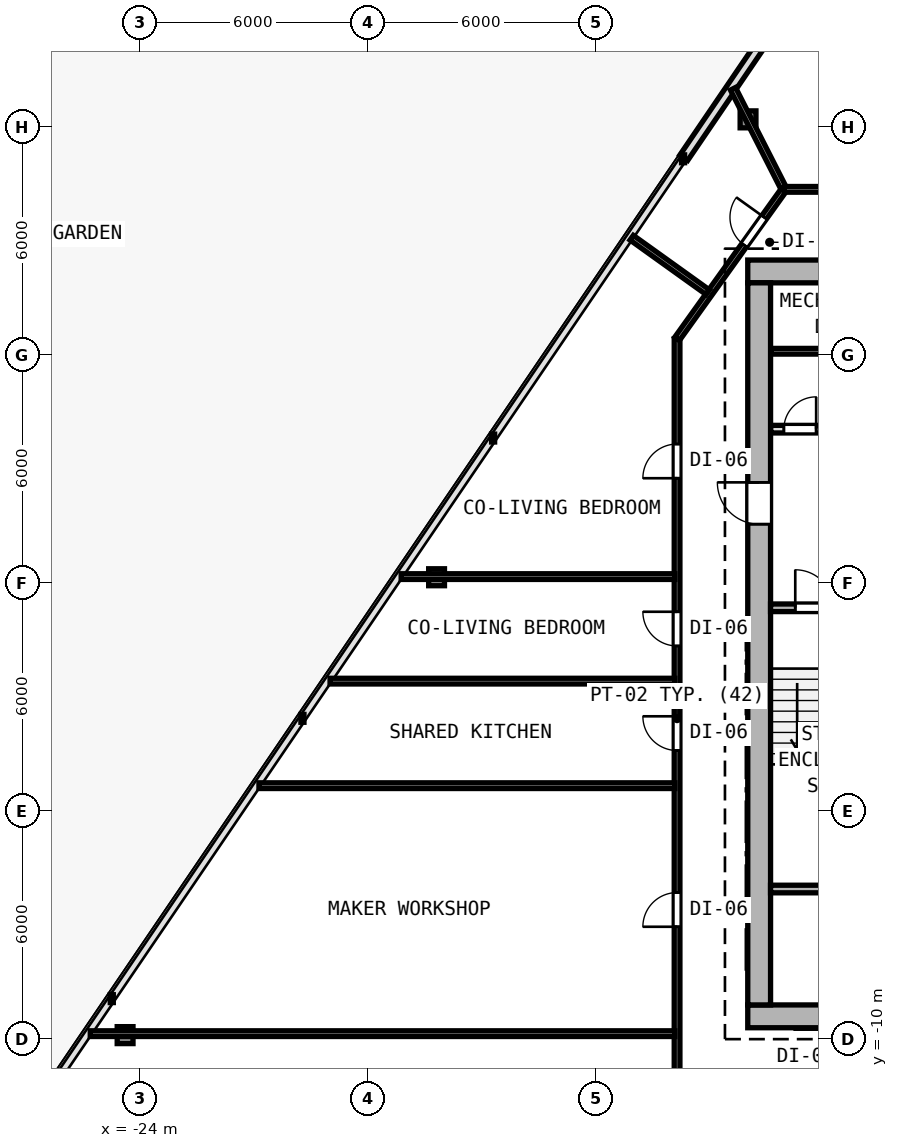
"""IFC4 building model, lengths in metres.
Left out: names, types, materials, properties, quantities, classifications, styles, units other than length and angle.
Written with IfcOpenShell. Run it as: python <this file> out.ifc"""

import sys

from ifc_helpers import new_model, si_unit, direction, frame, frame_2d, origin, origin_2d, place, context, subcontext, project, spatial, rectangle, i_section, extrude, element, fill, save


model = new_model("IFC4")
c1 = context("Model", 3, precision=1e-05, world=origin(), true_north=direction((0.0, 1.0)))
c2 = subcontext(c1, "Body", "Model", "MODEL_VIEW")
j1 = project(units=[si_unit("LENGTHUNIT", "METRE"), si_unit("PLANEANGLEUNIT", "RADIAN")], contexts=[c1])
p1 = place(None, origin())
s1 = spatial("IfcSite", under=j1, at=p1, CompositionType="ELEMENT")
p2 = place(p1, origin())
s2 = spatial("IfcBuilding", under=s1, at=p2, CompositionType="ELEMENT")
p3 = place(p2, frame((0.0, 0.0, 26.4)))
s3 = spatial("IfcBuildingStorey", under=s2, at=p3, CompositionType="ELEMENT", Elevation=26.4)
for number, where, z_axis, x_axis in (
    (1, (-7.7, -9.4, 0.0), (0.0, 0.0, 1.0), (1.0, 0.0, 0.0)),
    (2, (-7.7, 10.2, 0.0), (0.0, 0.0, 1.0), (1.0, 0.0, 0.0)),
    (3, (-7.7, 2.0, 0.0), (0.0, 0.0, 1.0), (1.0, 0.0, 0.0)),
):
    element("IfcColumn", number, at=place(p3, frame(where, z_axis=z_axis, x_axis=x_axis)), inside=s3, PredefinedType="COLUMN", context=c2, shape_type="SweptSolid", body=[
        extrude(i_section(OverallWidth=0.416, OverallDepth=0.446, WebThickness=0.025, FlangeThickness=0.04, FilletRadius=0.015, at=origin_2d()), origin(), (0.0, 0.0, 1.0), 3.6),
    ])
p4 = place(p3, frame((-7.992, 14.202, 0.015), z_axis=(0.008798483968, -0.002591801479, 0.999957933738), x_axis=(0.282568886397, 0.959247009086, 0.0)))
e4 = element("IfcColumn", 4, at=p4, inside=s3, PredefinedType="COLUMN", context=c2, shape_type="SweptSolid", body=[
    extrude(i_section(OverallWidth=0.416, OverallDepth=0.446, WebThickness=0.025, FlangeThickness=0.04, FilletRadius=0.015, at=origin_2d()), origin(), (0.0, 0.0, 1.0), 3.58),
])
p5 = place(p3, frame((-16.188, 2.154, 0.015), z_axis=(0.017048787183, 0.009547320822, 0.999809075534), x_axis=(-0.488603368932, 0.87250601595, 0.0)))
e5 = element("IfcColumn", 5, at=p5, inside=s3, PredefinedType="COLUMN", context=c2, shape_type="SweptSolid", body=[
    extrude(i_section(OverallWidth=0.416, OverallDepth=0.446, WebThickness=0.025, FlangeThickness=0.04, FilletRadius=0.015, at=origin_2d()), origin(), (0.0, 0.0, 1.0), 3.58),
])
p6 = place(p3, frame((-24.385, -9.894, 0.015), z_axis=(0.025291188493, 0.021678161566, 0.999445052565), x_axis=(-0.650791373456, 0.759256602365, 0.0)))
e6 = element("IfcColumn", 6, at=p6, inside=s3, PredefinedType="COLUMN", context=c2, shape_type="SweptSolid", body=[
    extrude(i_section(OverallWidth=0.416, OverallDepth=0.446, WebThickness=0.025, FlangeThickness=0.04, FilletRadius=0.015, at=origin_2d()), origin(), (0.0, 0.0, 1.0), 3.581),
])
p7 = place(p3, frame((-9.684, 13.191, 0.0), z_axis=(0.0, 0.0, 1.0), x_axis=(0.562473549685, 0.826815279192, 0.0)))
e7 = element("IfcWall", 7, at=p7, inside=s3, PredefinedType="SOLIDWALL", context=c2, shape_type="SweptSolid", body=[
    extrude(rectangle(XDim=12.536, YDim=0.25, at=frame_2d((6.268, 0.0))), origin(), (0.0, 0.0, 1.0), 3.35),
])
p8 = place(p7, frame((5.468, 0.0, 0.62)))
e8 = element("IfcOpeningElement", 8, at=p8, cuts=e7, PredefinedType="OPENING", context=c2, shape_type="SweptSolid", body=[
    extrude(rectangle(XDim=1.6, YDim=2.1, at=frame_2d((0.8, 1.05))), frame((0.0, 0.135, 0.0), z_axis=(0.0, -1.0, 0.0), x_axis=(1.0, 0.0, 0.0)), (0.0, 0.0, 1.0), 0.27),
])
p9 = place(p3, frame((-8.0, -9.4, 0.0), z_axis=(0.0, 0.0, 1.0), x_axis=(1.0, 0.0, 0.0)))
e9 = element("IfcWall", 9, at=p9, inside=s3, PredefinedType="SHEAR", context=c2, shape_type="SweptSolid", body=[
    extrude(rectangle(XDim=16.0, YDim=0.6, at=frame_2d((8.0, 0.0))), origin(), (0.0, 0.0, 1.0), 3.35),
])
p10 = place(p9, frame((9.65, 0.0, 0.0)))
e10 = element("IfcOpeningElement", 10, at=p10, cuts=e9, PredefinedType="OPENING", context=c2, shape_type="SweptSolid", body=[
    extrude(rectangle(XDim=1.5, YDim=2.2, at=frame_2d((0.75, 1.1))), frame((0.0, 0.31, 0.0), z_axis=(0.0, -1.0, 0.0), x_axis=(1.0, 0.0, 0.0)), (0.0, 0.0, 1.0), 0.62),
])
p11 = place(p3, frame((8.0, 10.2, 0.0), z_axis=(0.0, 0.0, 1.0), x_axis=(-1.0, 0.0, 0.0)))
e11 = element("IfcWall", 11, at=p11, inside=s3, PredefinedType="SHEAR", context=c2, shape_type="SweptSolid", body=[
    extrude(rectangle(XDim=16.0, YDim=0.6, at=frame_2d((8.0, 0.0))), origin(), (0.0, 0.0, 1.0), 3.35),
])
p12 = place(p11, frame((4.45, 0.0, 0.0)))
e12 = element("IfcOpeningElement", 12, at=p12, cuts=e11, PredefinedType="OPENING", context=c2, shape_type="SweptSolid", body=[
    extrude(rectangle(XDim=1.1, YDim=2.15, at=frame_2d((0.55, 1.075))), frame((0.0, 0.31, 0.0), z_axis=(0.0, -1.0, 0.0), x_axis=(1.0, 0.0, 0.0)), (0.0, 0.0, 1.0), 0.62),
])
p13 = place(p3, frame((-7.7, -9.1, 0.0), z_axis=(0.0, 0.0, 1.0), x_axis=(0.0, 1.0, 0.0)))
e13 = element("IfcWall", 13, at=p13, inside=s3, PredefinedType="SHEAR", context=c2, shape_type="SweptSolid", body=[
    extrude(rectangle(XDim=19.0, YDim=0.6, at=frame_2d((9.5, 0.0))), origin(), (0.0, 0.0, 1.0), 3.35),
])
p14 = place(p13, frame((12.65, 0.0, 0.0)))
e14 = element("IfcOpeningElement", 14, at=p14, cuts=e13, PredefinedType="OPENING", context=c2, shape_type="SweptSolid", body=[
    extrude(rectangle(XDim=1.1, YDim=2.15, at=frame_2d((0.55, 1.075))), frame((0.0, 0.31, 0.0), z_axis=(0.0, -1.0, 0.0), x_axis=(1.0, 0.0, 0.0)), (0.0, 0.0, 1.0), 0.62),
])
p15 = place(p3, frame((-7.4, 1.35, 0.0), z_axis=(0.0, 0.0, 1.0), x_axis=(1.0, 0.0, 0.0)))
e15 = element("IfcWall", 15, at=p15, inside=s3, PredefinedType="SOLIDWALL", context=c2, shape_type="SweptSolid", body=[
    extrude(rectangle(XDim=3.35, YDim=0.2, at=frame_2d((1.675, 0.0))), origin(), (0.0, 0.0, 1.0), 3.35),
])
p16 = place(p15, frame((0.65, 0.0, 0.0)))
e16 = element("IfcOpeningElement", 16, at=p16, cuts=e15, PredefinedType="OPENING", context=c2, shape_type="SweptSolid", body=[
    extrude(rectangle(XDim=1.0, YDim=2.15, at=frame_2d((0.5, 1.075))), frame((0.0, 0.11, 0.0), z_axis=(0.0, -1.0, 0.0), x_axis=(1.0, 0.0, 0.0)), (0.0, 0.0, 1.0), 0.22),
])
p17 = place(p3, frame((-7.395, 6.05, 0.0), z_axis=(0.0, 0.0, 1.0), x_axis=(1.0, 0.0, 0.0)))
e17 = element("IfcWall", 17, at=p17, inside=s3, PredefinedType="SOLIDWALL", context=c2, shape_type="SweptSolid", body=[
    extrude(rectangle(XDim=3.545, YDim=0.2, at=frame_2d((1.772, 0.0))), origin(), (0.0, 0.0, 1.0), 3.35),
])
p18 = place(p17, frame((0.345, 0.0, 0.0)))
e18 = element("IfcOpeningElement", 18, at=p18, cuts=e17, PredefinedType="OPENING", context=c2, shape_type="SweptSolid", body=[
    extrude(rectangle(XDim=0.85, YDim=2.1, at=frame_2d((0.425, 1.05))), frame((0.0, 0.11, 0.0), z_axis=(0.0, -1.0, 0.0), x_axis=(1.0, 0.0, 0.0)), (0.0, 0.0, 1.0), 0.22),
])
p19 = place(p17, frame((2.145, 0.0, 0.0)))
e19 = element("IfcOpeningElement", 19, at=p19, cuts=e17, PredefinedType="OPENING", context=c2, shape_type="SweptSolid", body=[
    extrude(rectangle(XDim=0.85, YDim=2.1, at=frame_2d((0.425, 1.05))), frame((0.0, 0.11, 0.0), z_axis=(0.0, -1.0, 0.0), x_axis=(1.0, 0.0, 0.0)), (0.0, 0.0, 1.0), 0.22),
])
p20 = place(p3, frame((-7.395, 8.1, 0.0), z_axis=(0.0, 0.0, 1.0), x_axis=(1.0, 0.0, 0.0)))
e20 = element("IfcWall", 20, at=p20, inside=s3, PredefinedType="PARTITIONING", context=c2, shape_type="SweptSolid", body=[
    extrude(rectangle(XDim=3.545, YDim=0.15, at=frame_2d((1.772, 0.0))), origin(), (0.0, 0.0, 1.0), 3.35),
])
p21 = place(p3, frame((-7.4, -6.05, 0.0), z_axis=(0.0, 0.0, 1.0), x_axis=(1.0, 0.0, 0.0)))
e21 = element("IfcWall", 21, at=p21, inside=s3, PredefinedType="SOLIDWALL", context=c2, shape_type="SweptSolid", body=[
    extrude(rectangle(XDim=3.35, YDim=0.2, at=frame_2d((1.675, 0.0))), origin(), (0.0, 0.0, 1.0), 3.35),
])
p22 = place(p3, frame((-9.86, -11.56, 0.0), z_axis=(0.0, 0.0, 1.0), x_axis=(0.0, 1.0, 0.0)))
e22 = element("IfcWall", 22, at=p22, inside=s3, PredefinedType="PARTITIONING", context=c2, shape_type="SweptSolid", body=[
    extrude(rectangle(XDim=19.986, YDim=0.15, at=frame_2d((9.993, 0.0))), origin(), (0.0, 0.0, 1.0), 2.609),
])
p23 = place(p22, frame((9.155, 0.0, 0.0)))
e23 = element("IfcOpeningElement", 23, at=p23, cuts=e22, PredefinedType="OPENING", context=c2, shape_type="SweptSolid", body=[
    extrude(rectangle(XDim=0.9, YDim=2.1, at=frame_2d((0.45, 1.05))), frame((0.0, 0.085, 0.0), z_axis=(0.0, -1.0, 0.0), x_axis=(1.0, 0.0, 0.0)), (0.0, 0.0, 1.0), 0.17),
])
p24 = place(p22, frame((4.517, 0.0, 0.0)))
e24 = element("IfcOpeningElement", 24, at=p24, cuts=e22, PredefinedType="OPENING", context=c2, shape_type="SweptSolid", body=[
    extrude(rectangle(XDim=0.9, YDim=2.1, at=frame_2d((0.45, 1.05))), frame((0.0, 0.085, 0.0), z_axis=(0.0, -1.0, 0.0), x_axis=(1.0, 0.0, 0.0)), (0.0, 0.0, 1.0), 0.17),
])
p25 = place(p22, frame((16.319, 0.0, 0.0)))
e25 = element("IfcOpeningElement", 25, at=p25, cuts=e22, PredefinedType="OPENING", context=c2, shape_type="SweptSolid", body=[
    extrude(rectangle(XDim=0.9, YDim=2.1, at=frame_2d((0.45, 1.05))), frame((0.0, 0.085, 0.0), z_axis=(0.0, -1.0, 0.0), x_axis=(1.0, 0.0, 0.0)), (0.0, 0.0, 1.0), 0.17),
])
p26 = place(p22, frame((11.906, 0.0, 0.0)))
e26 = element("IfcOpeningElement", 26, at=p26, cuts=e22, PredefinedType="OPENING", context=c2, shape_type="SweptSolid", body=[
    extrude(rectangle(XDim=0.9, YDim=2.1, at=frame_2d((0.45, 1.05))), frame((0.0, 0.085, 0.0), z_axis=(0.0, -1.0, 0.0), x_axis=(1.0, 0.0, 0.0)), (0.0, 0.0, 1.0), 0.17),
])
p27 = place(p3, frame((-9.86, 8.426, 0.0), z_axis=(0.0, 0.0, 1.0), x_axis=(0.582449511476, 0.812866881218, 0.0)))
e27 = element("IfcWall", 27, at=p27, inside=s3, PredefinedType="PARTITIONING", context=c2, shape_type="SweptSolid", body=[
    extrude(rectangle(XDim=4.84, YDim=0.15, at=frame_2d((2.42, 0.0))), origin(), (0.0, 0.0, 1.0), 2.725),
])
p28 = place(p27, frame((3.035, 0.0, 0.0)))
e28 = element("IfcOpeningElement", 28, at=p28, cuts=e27, PredefinedType="OPENING", context=c2, shape_type="SweptSolid", body=[
    extrude(rectangle(XDim=0.9, YDim=2.1, at=frame_2d((0.45, 1.05))), frame((0.0, 0.085, 0.0), z_axis=(0.0, -1.0, 0.0), x_axis=(1.0, 0.0, 0.0)), (0.0, 0.0, 1.0), 0.17),
])
p29 = place(p3, frame((-7.041, 12.36, 0.0), z_axis=(0.0, 0.0, 1.0), x_axis=(1.0, 0.0, 0.0)))
e29 = element("IfcWall", 29, at=p29, inside=s3, PredefinedType="PARTITIONING", context=c2, shape_type="SweptSolid", body=[
    extrude(rectangle(XDim=14.082, YDim=0.15, at=frame_2d((7.041, 0.0))), origin(), (0.0, 0.0, 1.0), 3.35),
])
p30 = place(p29, frame((10.256, 0.0, 0.0)))
e30 = element("IfcOpeningElement", 30, at=p30, cuts=e29, PredefinedType="OPENING", context=c2, shape_type="SweptSolid", body=[
    extrude(rectangle(XDim=0.9, YDim=2.1, at=frame_2d((0.45, 1.05))), frame((0.0, 0.085, 0.0), z_axis=(0.0, -1.0, 0.0), x_axis=(1.0, 0.0, 0.0)), (0.0, 0.0, 1.0), 0.17),
])
p31 = place(p29, frame((3.393, 0.0, 0.0)))
e31 = element("IfcOpeningElement", 31, at=p31, cuts=e29, PredefinedType="OPENING", context=c2, shape_type="SweptSolid", body=[
    extrude(rectangle(XDim=0.9, YDim=2.1, at=frame_2d((0.45, 1.05))), frame((0.0, 0.085, 0.0), z_axis=(0.0, -1.0, 0.0), x_axis=(1.0, 0.0, 0.0)), (0.0, 0.0, 1.0), 0.17),
])
p32 = place(p3, frame((-7.064, 12.404, 0.0), z_axis=(0.0, 0.0, 1.0), x_axis=(-0.453724092979, 0.891142215053, 0.0)))
e32 = element("IfcWall", 32, at=p32, inside=s3, PredefinedType="PARTITIONING", context=c2, shape_type="SweptSolid", body=[
    extrude(rectangle(XDim=2.92, YDim=0.15, at=frame_2d((1.46, 0.0))), origin(), (0.0, 0.0, 1.0), 2.725),
])
p33 = place(p3, frame((-9.92, 2.171, 0.0), z_axis=(0.0, 0.0, 1.0), x_axis=(-1.0, 0.0, 0.0)))
e33 = element("IfcWall", 33, at=p33, inside=s3, PredefinedType="PARTITIONING", context=c2, shape_type="SweptSolid", body=[
    extrude(rectangle(XDim=7.2, YDim=0.15, at=frame_2d((3.6, 0.0))), origin(), (0.0, 0.0, 1.0), 2.725),
])
p34 = place(p3, frame((-9.92, -9.855, 0.0), z_axis=(0.0, 0.0, 1.0), x_axis=(-1.0, 0.0, 0.0)))
e34 = element("IfcWall", 34, at=p34, inside=s3, PredefinedType="PARTITIONING", context=c2, shape_type="SweptSolid", body=[
    extrude(rectangle(XDim=15.382, YDim=0.15, at=frame_2d((7.691, 0.0))), origin(), (0.0, 0.0, 1.0), 2.609),
])
p35 = place(p3, frame((-9.92, -3.331, 0.0), z_axis=(0.0, 0.0, 1.0), x_axis=(-1.0, 0.0, 0.0)))
e35 = element("IfcWall", 35, at=p35, inside=s3, PredefinedType="PARTITIONING", context=c2, shape_type="SweptSolid", body=[
    extrude(rectangle(XDim=10.943, YDim=0.15, at=frame_2d((5.471, 0.0))), origin(), (0.0, 0.0, 1.0), 2.735),
])
p36 = place(p3, frame((-9.053, 9.654, 0.0), z_axis=(0.0, 0.0, 1.0), x_axis=(-0.812868003182, 0.58244794566, 0.0)))
e36 = element("IfcWall", 36, at=p36, inside=s3, PredefinedType="PARTITIONING", context=c2, shape_type="SweptSolid", body=[
    extrude(rectangle(XDim=2.461, YDim=0.15, at=frame_2d((1.231, 0.0))), origin(), (0.0, 0.0, 1.0), 2.735),
])
p37 = place(p3, frame((-9.92, -0.58, 0.0), z_axis=(0.0, 0.0, 1.0), x_axis=(-1.0, 0.0, 0.0)))
e37 = element("IfcWall", 37, at=p37, inside=s3, PredefinedType="PARTITIONING", context=c2, shape_type="SweptSolid", body=[
    extrude(rectangle(XDim=9.072, YDim=0.15, at=frame_2d((4.536, 0.0))), origin(), (0.0, 0.0, 1.0), 2.735),
])
p38 = place(p14, origin())
e38 = element("IfcDoor", 38, at=p38, inside=s3, OperationType="SINGLE_SWING_RIGHT", PredefinedType="DOOR", context=c2, shape_type="SweptSolid", body=[
    extrude(rectangle(XDim=1.1, YDim=2.15, at=frame_2d((0.55, 1.075))), frame((0.0, 0.025, 0.0), z_axis=(0.0, -1.0, 0.0), x_axis=(1.0, 0.0, 0.0)), (0.0, 0.0, 1.0), 0.05),
])
fill(e14, e38)
p39 = place(p16, origin())
e39 = element("IfcDoor", 39, at=p39, inside=s3, OperationType="SINGLE_SWING_LEFT", PredefinedType="DOOR", context=c2, shape_type="SweptSolid", body=[
    extrude(rectangle(XDim=1.0, YDim=2.15, at=frame_2d((0.5, 1.075))), frame((0.0, 0.025, 0.0), z_axis=(0.0, -1.0, 0.0), x_axis=(1.0, 0.0, 0.0)), (0.0, 0.0, 1.0), 0.05),
])
fill(e16, e39)
p40 = place(p18, origin())
e40 = element("IfcDoor", 40, at=p40, inside=s3, OperationType="SINGLE_SWING_RIGHT", PredefinedType="DOOR", context=c2, shape_type="SweptSolid", body=[
    extrude(rectangle(XDim=0.85, YDim=2.1, at=frame_2d((0.425, 1.05))), frame((0.0, 0.025, 0.0), z_axis=(0.0, -1.0, 0.0), x_axis=(1.0, 0.0, 0.0)), (0.0, 0.0, 1.0), 0.05),
])
fill(e18, e40)
p41 = place(p23, origin())
e41 = element("IfcDoor", 41, at=p41, inside=s3, OperationType="SINGLE_SWING_RIGHT", PredefinedType="DOOR", context=c2, shape_type="SweptSolid", body=[
    extrude(rectangle(XDim=0.9, YDim=2.1, at=frame_2d((0.45, 1.05))), frame((0.0, 0.025, 0.0), z_axis=(0.0, -1.0, 0.0), x_axis=(1.0, 0.0, 0.0)), (0.0, 0.0, 1.0), 0.05),
])
fill(e23, e41)
p42 = place(p24, origin())
e42 = element("IfcDoor", 42, at=p42, inside=s3, OperationType="SINGLE_SWING_LEFT", PredefinedType="DOOR", context=c2, shape_type="SweptSolid", body=[
    extrude(rectangle(XDim=0.9, YDim=2.1, at=frame_2d((0.45, 1.05))), frame((0.0, 0.025, 0.0), z_axis=(0.0, -1.0, 0.0), x_axis=(1.0, 0.0, 0.0)), (0.0, 0.0, 1.0), 0.05),
])
fill(e24, e42)
p43 = place(p28, origin())
e43 = element("IfcDoor", 43, at=p43, inside=s3, OperationType="SINGLE_SWING_RIGHT", PredefinedType="DOOR", context=c2, shape_type="SweptSolid", body=[
    extrude(rectangle(XDim=0.9, YDim=2.1, at=frame_2d((0.45, 1.05))), frame((0.0, 0.025, 0.0), z_axis=(0.0, -1.0, 0.0), x_axis=(1.0, 0.0, 0.0)), (0.0, 0.0, 1.0), 0.05),
])
fill(e28, e43)
p44 = place(p25, origin())
e44 = element("IfcDoor", 44, at=p44, inside=s3, OperationType="SINGLE_SWING_LEFT", PredefinedType="DOOR", context=c2, shape_type="SweptSolid", body=[
    extrude(rectangle(XDim=0.9, YDim=2.1, at=frame_2d((0.45, 1.05))), frame((0.0, 0.025, 0.0), z_axis=(0.0, -1.0, 0.0), x_axis=(1.0, 0.0, 0.0)), (0.0, 0.0, 1.0), 0.05),
])
fill(e25, e44)
p45 = place(p26, origin())
e45 = element("IfcDoor", 45, at=p45, inside=s3, OperationType="SINGLE_SWING_RIGHT", PredefinedType="DOOR", context=c2, shape_type="SweptSolid", body=[
    extrude(rectangle(XDim=0.9, YDim=2.1, at=frame_2d((0.45, 1.05))), frame((0.0, 0.025, 0.0), z_axis=(0.0, -1.0, 0.0), x_axis=(1.0, 0.0, 0.0)), (0.0, 0.0, 1.0), 0.05),
])
fill(e26, e45)
save(model, sys.argv[1])
